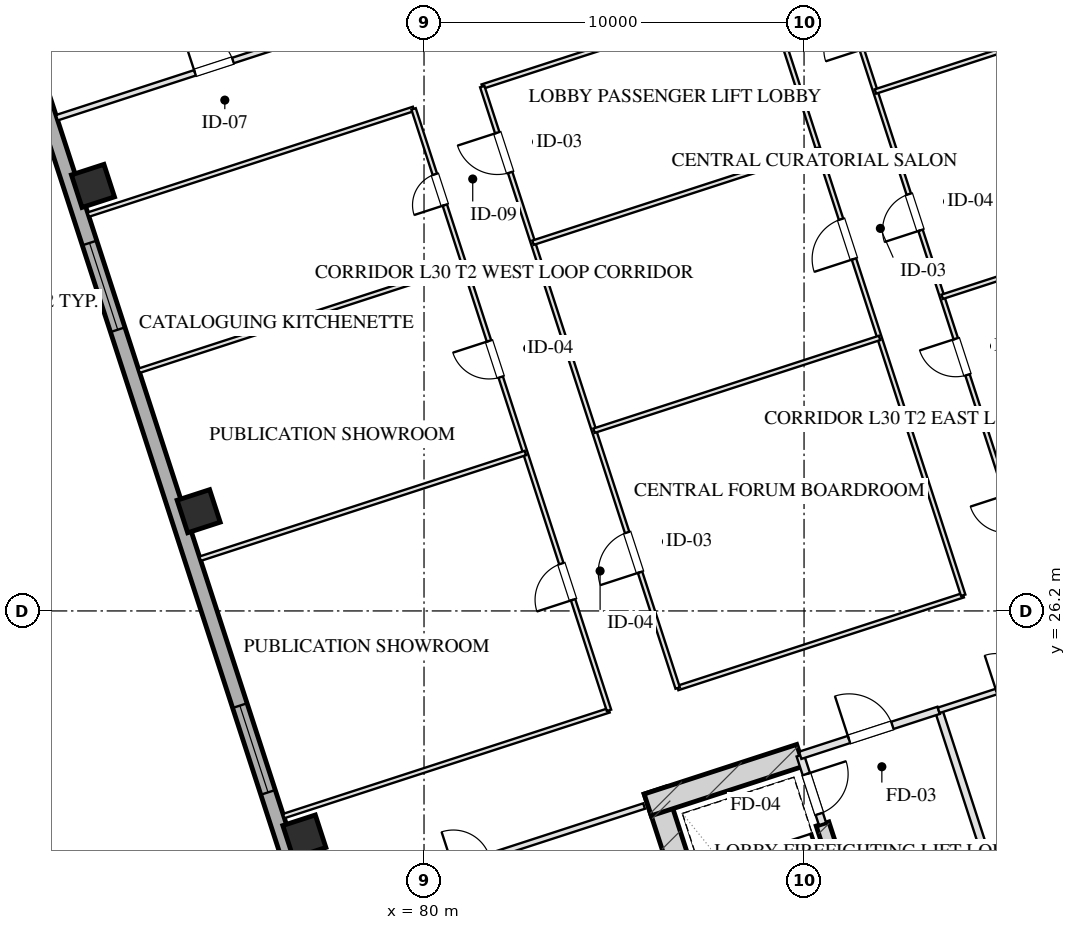
"""IFC4 building model, lengths in metres.
Left out: names, types, materials, properties, quantities, classifications, styles, units other than length and angle.
Written with IfcOpenShell. Run it as: python <this file> out.ifc"""

import sys

from ifc_helpers import new_model, si_unit, direction, frame, frame_2d, origin, origin_2d, place, context, subcontext, project, spatial, rectangle, hollow_rectangle, extrude, element, fill, save


model = new_model("IFC4")
c1 = context("Model", 3, precision=1e-05, world=origin(), true_north=direction((0.0, 1.0)))
c2 = subcontext(c1, "Body", "Model", "MODEL_VIEW")
j1 = project(units=[si_unit("LENGTHUNIT", "METRE"), si_unit("PLANEANGLEUNIT", "RADIAN")], contexts=[c1])
p1 = place(None, origin())
s1 = spatial("IfcSite", under=j1, at=p1, CompositionType="ELEMENT")
p2 = place(p1, origin())
s2 = spatial("IfcBuilding", under=s1, at=p2, CompositionType="ELEMENT")
p3 = place(p2, frame((0.0, 0.0, 117.3)))
s3 = spatial("IfcBuildingStorey", under=s2, at=p3, CompositionType="ELEMENT", Elevation=117.3)
p4 = place(p3, frame((86.078, 21.475, 0.0), z_axis=(0.0, 0.0, 1.0), x_axis=(0.309017938678, -0.951056209472, 0.0)))
e1 = element("IfcWall", 1, at=p4, inside=s3, PredefinedType="SHEAR", context=c2, shape_type="SweptSolid", body=[
    extrude(rectangle(XDim=9.48, YDim=0.6, at=frame_2d((4.74, 0.0))), origin(), (0.0, 0.0, 1.0), 3.45),
])
p5 = place(p3, frame((90.486, 20.594, 0.0), z_axis=(0.0, 0.0, 1.0), x_axis=(0.309020428229, -0.951055400562, 0.0)))
e2 = element("IfcWall", 2, at=p5, inside=s3, PredefinedType="SHEAR", context=c2, shape_type="SweptSolid", body=[
    extrude(rectangle(XDim=6.98, YDim=0.35, at=frame_2d((3.49, 0.0))), origin(), (0.0, 0.0, 1.0), 3.45),
])
p6 = place(p3, frame((85.886, 21.097, 0.0), z_axis=(0.0, 0.0, 1.0), x_axis=(0.951068073652, 0.308981422225, 0.0)))
e3 = element("IfcWall", 3, at=p6, inside=s3, PredefinedType="SHEAR", context=c2, shape_type="SweptSolid", body=[
    extrude(rectangle(XDim=4.22, YDim=0.6, at=frame_2d((2.11, 0.0))), origin(), (0.0, 0.0, 1.0), 3.45),
])
for number, where, z_axis, x_axis in (
    (4, (76.851, 20.264, 0.0), (0.0, 0.0, 1.0), (0.951, 0.309, 0.0)),
    (5, (74.07, 28.824, 0.0), (0.0, 0.0, 1.0), (0.951, 0.309, 0.0)),
    (6, (71.289, 37.384, 0.0), (0.0, 0.0, 1.0), (0.951, 0.309, 0.0)),
):
    element("IfcColumn", number, at=place(p3, frame(where, z_axis=z_axis, x_axis=x_axis)), inside=s3, PredefinedType="COLUMN", context=c2, shape_type="SweptSolid", body=[
        extrude(hollow_rectangle(XDim=0.9, YDim=0.9, WallThickness=0.032, at=origin_2d()), origin(), (0.0, 0.0, 1.0), 3.451),
    ])
p7 = place(p3, frame((80.716, 6.59, 0.0), z_axis=(0.0, 0.0, 1.0), x_axis=(-0.309017542002, 0.95105633836, 0.0)))
e7 = element("IfcWall", 7, at=p7, inside=s3, PredefinedType="SOLIDWALL", context=c2, shape_type="SweptSolid", body=[
    extrude(rectangle(XDim=46.4, YDim=0.4, at=frame_2d((23.2, 0.0))), origin(), (0.0, 0.0, 1.0), 2.61),
])
p8 = place(p7, frame((15.6, 0.0, 0.75)))
e8 = element("IfcOpeningElement", 8, at=p8, cuts=e7, PredefinedType="OPENING", context=c2, shape_type="SweptSolid", body=[
    extrude(rectangle(XDim=2.4, YDim=1.46, at=frame_2d((1.2, 0.73))), frame((0.0, 0.21, 0.0), z_axis=(0.0, -1.0, 0.0), x_axis=(1.0, 0.0, 0.0)), (0.0, 0.0, 1.0), 0.42),
])
p9 = place(p7, frame((28.4, 0.0, 0.75)))
e9 = element("IfcOpeningElement", 9, at=p9, cuts=e7, PredefinedType="OPENING", context=c2, shape_type="SweptSolid", body=[
    extrude(rectangle(XDim=2.4, YDim=1.46, at=frame_2d((1.2, 0.73))), frame((0.0, 0.21, 0.0), z_axis=(0.0, -1.0, 0.0), x_axis=(1.0, 0.0, 0.0)), (0.0, 0.0, 1.0), 0.42),
])
p10 = place(p3, frame((89.899, 22.401, 0.0), z_axis=(0.0, 0.0, 1.0), x_axis=(0.308932062672, -0.951084108086, 0.0)))
e10 = element("IfcWall", 10, at=p10, inside=s3, PredefinedType="PARTITIONING", context=c2, shape_type="SweptSolid", body=[
    extrude(rectangle(XDim=1.9, YDim=0.2, at=frame_2d((0.95, 0.0))), origin(), (0.0, 0.0, 1.0), 3.175),
])
p11 = place(p10, frame((0.52, 0.0, 0.0)))
e11 = element("IfcOpeningElement", 11, at=p11, cuts=e10, PredefinedType="OPENING", context=c2, shape_type="SweptSolid", body=[
    extrude(rectangle(XDim=1.1, YDim=2.05, at=frame_2d((0.55, 1.025))), frame((0.0, 0.11, 0.0), z_axis=(0.0, -1.0, 0.0), x_axis=(1.0, 0.0, 0.0)), (0.0, 0.0, 1.0), 0.22),
])
p12 = place(p3, frame((93.542, 23.585, 0.0), z_axis=(0.0, 0.0, 1.0), x_axis=(0.309042196757, -0.951048327176, 0.0)))
e12 = element("IfcWall", 12, at=p12, inside=s3, PredefinedType="PARTITIONING", context=c2, shape_type="SweptSolid", body=[
    extrude(rectangle(XDim=8.43, YDim=0.2, at=frame_2d((4.215, 0.0))), origin(), (0.0, 0.0, 1.0), 3.175),
])
p13 = place(p3, frame((89.899, 22.401, 0.0), z_axis=(0.0, 0.0, 1.0), x_axis=(0.951046716504, 0.309047153403, 0.0)))
e13 = element("IfcWall", 13, at=p13, inside=s3, PredefinedType="PARTITIONING", context=c2, shape_type="SweptSolid", body=[
    extrude(rectangle(XDim=3.83, YDim=0.2, at=frame_2d((1.915, 0.0))), origin(), (0.0, 0.0, 1.0), 3.175),
])
p14 = place(p13, frame((1.35, 0.0, 0.0)))
e14 = element("IfcOpeningElement", 14, at=p14, cuts=e13, PredefinedType="OPENING", context=c2, shape_type="SweptSolid", body=[
    extrude(rectangle(XDim=1.2, YDim=2.05, at=frame_2d((0.6, 1.025))), frame((0.0, 0.11, 0.0), z_axis=(0.0, -1.0, 0.0), x_axis=(1.0, 0.0, 0.0)), (0.0, 0.0, 1.0), 0.22),
])
p15 = place(p3, frame((93.542, 23.585, 0.0), z_axis=(0.0, 0.0, 1.0), x_axis=(0.951063829732, 0.308994485023, 0.0)))
e15 = element("IfcWall", 15, at=p15, inside=s3, PredefinedType="PARTITIONING", context=c2, shape_type="SweptSolid", body=[
    extrude(rectangle(XDim=4.4, YDim=0.15, at=frame_2d((2.2, 0.0))), origin(), (0.0, 0.0, 1.0), 3.175),
])
p16 = place(p15, frame((1.6, 0.0, 0.0)))
e16 = element("IfcOpeningElement", 16, at=p16, cuts=e15, PredefinedType="OPENING", context=c2, shape_type="SweptSolid", body=[
    extrude(rectangle(XDim=1.0, YDim=2.05, at=frame_2d((0.5, 1.025))), frame((0.0, 0.085, 0.0), z_axis=(0.0, -1.0, 0.0), x_axis=(1.0, 0.0, 0.0)), (0.0, 0.0, 1.0), 0.17),
])
p17 = place(p3, frame((77.136, 18.254, 0.0), z_axis=(0.0, 0.0, 1.0), x_axis=(0.951057133767, 0.309015093986, 0.0)))
e17 = element("IfcWall", 17, at=p17, inside=s3, PredefinedType="PARTITIONING", context=c2, shape_type="SweptSolid", body=[
    extrude(rectangle(XDim=9.1, YDim=0.15, at=frame_2d((4.55, 0.0))), origin(), (0.0, 0.0, 1.0), 3.175),
])
p18 = place(p17, frame((3.822, 0.0, 0.0)))
e18 = element("IfcOpeningElement", 18, at=p18, cuts=e17, PredefinedType="OPENING", context=c2, shape_type="SweptSolid", body=[
    extrude(rectangle(XDim=1.0, YDim=2.05, at=frame_2d((0.5, 1.025))), frame((0.0, 0.085, 0.0), z_axis=(0.0, -1.0, 0.0), x_axis=(1.0, 0.0, 0.0)), (0.0, 0.0, 1.0), 0.17),
])
p19 = place(p3, frame((70.338, 39.177, 0.0), z_axis=(0.0, 0.0, 1.0), x_axis=(0.951059695568, 0.309007209409, 0.0)))
e19 = element("IfcWall", 19, at=p19, inside=s3, PredefinedType="PARTITIONING", context=c2, shape_type="SweptSolid", body=[
    extrude(rectangle(XDim=9.1, YDim=0.15, at=frame_2d((4.55, 0.0))), origin(), (0.0, 0.0, 1.0), 3.175),
])
p20 = place(p19, frame((3.822, 0.0, 0.0)))
e20 = element("IfcOpeningElement", 20, at=p20, cuts=e19, PredefinedType="OPENING", context=c2, shape_type="SweptSolid", body=[
    extrude(rectangle(XDim=1.05, YDim=2.05, at=frame_2d((0.525, 1.025))), frame((0.0, 0.085, 0.0), z_axis=(0.0, -1.0, 0.0), x_axis=(1.0, 0.0, 0.0)), (0.0, 0.0, 1.0), 0.17),
])
p21 = place(p3, frame((76.308, 20.803, 0.0), z_axis=(0.0, 0.0, 1.0), x_axis=(0.951054001411, 0.309024734286, 0.0)))
e21 = element("IfcWall", 21, at=p21, inside=s3, PredefinedType="PARTITIONING", context=c2, shape_type="SweptSolid", body=[
    extrude(rectangle(XDim=9.0, YDim=0.12, at=frame_2d((4.5, 0.0))), origin(), (0.0, 0.0, 1.0), 3.175),
])
p22 = place(p3, frame((86.675, 24.171, 0.0), z_axis=(0.0, 0.0, 1.0), x_axis=(0.951057231385, 0.309014793547, 0.0)))
e22 = element("IfcWall", 22, at=p22, inside=s3, PredefinedType="PARTITIONING", context=c2, shape_type="SweptSolid", body=[
    extrude(rectangle(XDim=7.9, YDim=0.12, at=frame_2d((3.95, 0.0))), origin(), (0.0, 0.0, 1.0), 3.175),
])
p23 = place(p3, frame((71.166, 36.629, 0.0), z_axis=(0.0, 0.0, 1.0), x_axis=(0.951059383421, 0.309008170129, 0.0)))
e23 = element("IfcWall", 23, at=p23, inside=s3, PredefinedType="PARTITIONING", context=c2, shape_type="SweptSolid", body=[
    extrude(rectangle(XDim=9.0, YDim=0.12, at=frame_2d((4.5, 0.0))), origin(), (0.0, 0.0, 1.0), 3.175),
])
p24 = place(p3, frame((81.532, 39.997, 0.0), z_axis=(0.0, 0.0, 1.0), x_axis=(0.951048148493, 0.309042746635, 0.0)))
e24 = element("IfcWall", 24, at=p24, inside=s3, PredefinedType="PARTITIONING", context=c2, shape_type="SweptSolid", body=[
    extrude(rectangle(XDim=7.9, YDim=0.12, at=frame_2d((3.95, 0.0))), origin(), (0.0, 0.0, 1.0), 3.175),
])
p25 = place(p3, frame((84.867, 23.584, 0.0), z_axis=(0.0, 0.0, 1.0), x_axis=(-0.309022042254, 0.951054876125, 0.0)))
e25 = element("IfcWall", 25, at=p25, inside=s3, PredefinedType="PARTITIONING", context=c2, shape_type="SweptSolid", body=[
    extrude(rectangle(XDim=16.64, YDim=0.12, at=frame_2d((8.32, 0.0))), origin(), (0.0, 0.0, 1.0), 3.175),
])
p26 = place(p25, frame((3.06, 0.0, 0.0)))
e26 = element("IfcOpeningElement", 26, at=p26, cuts=e25, PredefinedType="OPENING", context=c2, shape_type="SweptSolid", body=[
    extrude(rectangle(XDim=1.0, YDim=2.05, at=frame_2d((0.5, 1.025))), frame((0.0, 0.07, 0.0), z_axis=(0.0, -1.0, 0.0), x_axis=(1.0, 0.0, 0.0)), (0.0, 0.0, 1.0), 0.14),
])
p27 = place(p25, frame((9.22, 0.0, 0.0)))
e27 = element("IfcOpeningElement", 27, at=p27, cuts=e25, PredefinedType="OPENING", context=c2, shape_type="SweptSolid", body=[
    extrude(rectangle(XDim=1.0, YDim=2.05, at=frame_2d((0.5, 1.025))), frame((0.0, 0.07, 0.0), z_axis=(0.0, -1.0, 0.0), x_axis=(1.0, 0.0, 0.0)), (0.0, 0.0, 1.0), 0.14),
])
p28 = place(p25, frame((13.98, 0.0, 0.0)))
e28 = element("IfcOpeningElement", 28, at=p28, cuts=e25, PredefinedType="OPENING", context=c2, shape_type="SweptSolid", body=[
    extrude(rectangle(XDim=0.85, YDim=2.05, at=frame_2d((0.425, 1.025))), frame((0.0, 0.07, 0.0), z_axis=(0.0, -1.0, 0.0), x_axis=(1.0, 0.0, 0.0)), (0.0, 0.0, 1.0), 0.14),
])
p29 = place(p3, frame((86.675, 24.171, 0.0), z_axis=(0.0, 0.0, 1.0), x_axis=(-0.309022042254, 0.951054876125, 0.0)))
e29 = element("IfcWall", 29, at=p29, inside=s3, PredefinedType="PARTITIONING", context=c2, shape_type="SweptSolid", body=[
    extrude(rectangle(XDim=16.64, YDim=0.12, at=frame_2d((8.32, 0.0))), origin(), (0.0, 0.0, 1.0), 3.175),
])
p30 = place(p29, frame((3.204, 0.0, 0.0)))
e30 = element("IfcOpeningElement", 30, at=p30, cuts=e29, PredefinedType="OPENING", context=c2, shape_type="SweptSolid", body=[
    extrude(rectangle(XDim=1.1, YDim=2.05, at=frame_2d((0.55, 1.025))), frame((0.0, 0.07, 0.0), z_axis=(0.0, -1.0, 0.0), x_axis=(1.0, 0.0, 0.0)), (0.0, 0.0, 1.0), 0.14),
])
p31 = place(p29, frame((14.264, 0.0, 0.0)))
e31 = element("IfcOpeningElement", 31, at=p31, cuts=e29, PredefinedType="OPENING", context=c2, shape_type="SweptSolid", body=[
    extrude(rectangle(XDim=1.1, YDim=2.05, at=frame_2d((0.55, 1.025))), frame((0.0, 0.07, 0.0), z_axis=(0.0, -1.0, 0.0), x_axis=(1.0, 0.0, 0.0)), (0.0, 0.0, 1.0), 0.14),
])
p32 = place(p3, frame((94.188, 26.613, 0.0), z_axis=(0.0, 0.0, 1.0), x_axis=(-0.30901773025, 0.951056277195, 0.0)))
e32 = element("IfcWall", 32, at=p32, inside=s3, PredefinedType="PARTITIONING", context=c2, shape_type="SweptSolid", body=[
    extrude(rectangle(XDim=16.64, YDim=0.12, at=frame_2d((8.32, 0.0))), origin(), (0.0, 0.0, 1.0), 3.175),
])
p33 = place(p32, frame((9.304, 0.0, 0.0)))
e33 = element("IfcOpeningElement", 33, at=p33, cuts=e32, PredefinedType="OPENING", context=c2, shape_type="SweptSolid", body=[
    extrude(rectangle(XDim=1.1, YDim=2.05, at=frame_2d((0.55, 1.025))), frame((0.0, 0.07, 0.0), z_axis=(0.0, -1.0, 0.0), x_axis=(1.0, 0.0, 0.0)), (0.0, 0.0, 1.0), 0.14),
])
p34 = place(p3, frame((95.995, 27.2, 0.0), z_axis=(0.0, 0.0, 1.0), x_axis=(-0.309022042254, 0.951054876125, 0.0)))
e34 = element("IfcWall", 34, at=p34, inside=s3, PredefinedType="PARTITIONING", context=c2, shape_type="SweptSolid", body=[
    extrude(rectangle(XDim=16.64, YDim=0.12, at=frame_2d((8.32, 0.0))), origin(), (0.0, 0.0, 1.0), 3.175),
])
p35 = place(p34, frame((1.16, 0.0, 0.0)))
e35 = element("IfcOpeningElement", 35, at=p35, cuts=e34, PredefinedType="OPENING", context=c2, shape_type="SweptSolid", body=[
    extrude(rectangle(XDim=1.0, YDim=2.05, at=frame_2d((0.5, 1.025))), frame((0.0, 0.07, 0.0), z_axis=(0.0, -1.0, 0.0), x_axis=(1.0, 0.0, 0.0)), (0.0, 0.0, 1.0), 0.14),
])
p36 = place(p34, frame((5.48, 0.0, 0.0)))
e36 = element("IfcOpeningElement", 36, at=p36, cuts=e34, PredefinedType="OPENING", context=c2, shape_type="SweptSolid", body=[
    extrude(rectangle(XDim=1.0, YDim=2.05, at=frame_2d((0.5, 1.025))), frame((0.0, 0.07, 0.0), z_axis=(0.0, -1.0, 0.0), x_axis=(1.0, 0.0, 0.0)), (0.0, 0.0, 1.0), 0.14),
])
p37 = place(p34, frame((9.48, 0.0, 0.0)))
e37 = element("IfcOpeningElement", 37, at=p37, cuts=e34, PredefinedType="OPENING", context=c2, shape_type="SweptSolid", body=[
    extrude(rectangle(XDim=1.0, YDim=2.05, at=frame_2d((0.5, 1.025))), frame((0.0, 0.07, 0.0), z_axis=(0.0, -1.0, 0.0), x_axis=(1.0, 0.0, 0.0)), (0.0, 0.0, 1.0), 0.14),
])
p38 = place(p34, frame((14.48, 0.0, 0.0)))
e38 = element("IfcOpeningElement", 38, at=p38, cuts=e34, PredefinedType="OPENING", context=c2, shape_type="SweptSolid", body=[
    extrude(rectangle(XDim=1.0, YDim=2.05, at=frame_2d((0.5, 1.025))), frame((0.0, 0.07, 0.0), z_axis=(0.0, -1.0, 0.0), x_axis=(1.0, 0.0, 0.0)), (0.0, 0.0, 1.0), 0.14),
])
for number, where, z_axis, x_axis in (
    (39, (84.474, 30.943, 0.0), (0.0, 0.0, 1.0), (0.951, 0.309, 0.0)),
    (40, (82.867, 35.888, 0.0), (0.0, 0.0, 1.0), (0.951, 0.309, 0.0)),
):
    element("IfcWall", number, at=place(p3, frame(where, z_axis=z_axis, x_axis=x_axis)), inside=s3, PredefinedType="PARTITIONING", context=c2, shape_type="SweptSolid", body=[
        extrude(rectangle(XDim=7.9, YDim=0.12, at=frame_2d((3.95, 0.0))), origin(), (0.0, 0.0, 1.0), 3.175),
    ])
p39 = place(p3, frame((74.108, 27.574, 0.0), z_axis=(0.0, 0.0, 1.0), x_axis=(0.951054001411, 0.309024734286, 0.0)))
e41 = element("IfcWall", 41, at=p39, inside=s3, PredefinedType="PARTITIONING", context=c2, shape_type="SweptSolid", body=[
    extrude(rectangle(XDim=9.0, YDim=0.12, at=frame_2d((4.5, 0.0))), origin(), (0.0, 0.0, 1.0), 3.175),
])
p40 = place(p3, frame((72.501, 32.52, 0.0), z_axis=(0.0, 0.0, 1.0), x_axis=(0.951051410833, 0.309032706929, 0.0)))
e42 = element("IfcWall", 42, at=p40, inside=s3, PredefinedType="PARTITIONING", context=c2, shape_type="SweptSolid", body=[
    extrude(rectangle(XDim=9.0, YDim=0.12, at=frame_2d((4.5, 0.0))), origin(), (0.0, 0.0, 1.0), 3.175),
])
for number, where, z_axis, x_axis in (
    (43, (94.66, 31.308, 0.0), (0.0, 0.0, 1.0), (0.951, 0.309, 0.0)),
    (44, (93.634, 34.466, 0.0), (0.0, 0.0, 1.0), (0.951, 0.309, 0.0)),
):
    element("IfcWall", number, at=place(p3, frame(where, z_axis=z_axis, x_axis=x_axis)), inside=s3, PredefinedType="PARTITIONING", context=c2, shape_type="SweptSolid", body=[
        extrude(rectangle(XDim=13.5, YDim=0.12, at=frame_2d((6.75, 0.0))), origin(), (0.0, 0.0, 1.0), 3.175),
    ])
p41 = place(p3, frame((91.879, 39.868, 0.0), z_axis=(0.0, 0.0, 1.0), x_axis=(0.951054001411, 0.309024734286, 0.0)))
e45 = element("IfcWall", 45, at=p41, inside=s3, PredefinedType="PARTITIONING", context=c2, shape_type="SweptSolid", body=[
    extrude(rectangle(XDim=13.5, YDim=0.12, at=frame_2d((6.75, 0.0))), origin(), (0.0, 0.0, 1.0), 3.175),
])
p42 = place(p8, origin())
e46 = element("IfcWindow", 46, at=p42, inside=s3, PartitioningType="TRIPLE_PANEL_VERTICAL", PredefinedType="WINDOW", context=c2, shape_type="SweptSolid", body=[
    extrude(rectangle(XDim=2.4, YDim=1.46, at=frame_2d((1.2, 0.73))), frame((0.0, 0.03, 0.0), z_axis=(0.0, -1.0, 0.0), x_axis=(1.0, 0.0, 0.0)), (0.0, 0.0, 1.0), 0.06),
])
fill(e8, e46)
p43 = place(p9, origin())
e47 = element("IfcWindow", 47, at=p43, inside=s3, PartitioningType="TRIPLE_PANEL_VERTICAL", PredefinedType="WINDOW", context=c2, shape_type="SweptSolid", body=[
    extrude(rectangle(XDim=2.4, YDim=1.46, at=frame_2d((1.2, 0.73))), frame((0.0, 0.03, 0.0), z_axis=(0.0, -1.0, 0.0), x_axis=(1.0, 0.0, 0.0)), (0.0, 0.0, 1.0), 0.06),
])
fill(e9, e47)
p44 = place(p11, origin())
e48 = element("IfcDoor", 48, at=p44, inside=s3, OperationType="SINGLE_SWING_LEFT", PredefinedType="DOOR", context=c2, shape_type="SweptSolid", body=[
    extrude(rectangle(XDim=1.1, YDim=2.05, at=frame_2d((0.55, 1.025))), frame((0.0, 0.025, 0.0), z_axis=(0.0, -1.0, 0.0), x_axis=(1.0, 0.0, 0.0)), (0.0, 0.0, 1.0), 0.05),
])
fill(e11, e48)
p45 = place(p14, origin())
e49 = element("IfcDoor", 49, at=p45, inside=s3, OperationType="SINGLE_SWING_LEFT", PredefinedType="DOOR", context=c2, shape_type="SweptSolid", body=[
    extrude(rectangle(XDim=1.2, YDim=2.05, at=frame_2d((0.6, 1.025))), frame((0.0, 0.025, 0.0), z_axis=(0.0, -1.0, 0.0), x_axis=(1.0, 0.0, 0.0)), (0.0, 0.0, 1.0), 0.05),
])
fill(e14, e49)
p46 = place(p16, origin())
e50 = element("IfcDoor", 50, at=p46, inside=s3, OperationType="SINGLE_SWING_LEFT", PredefinedType="DOOR", context=c2, shape_type="SweptSolid", body=[
    extrude(rectangle(XDim=1.0, YDim=2.05, at=frame_2d((0.5, 1.025))), frame((0.0, 0.025, 0.0), z_axis=(0.0, -1.0, 0.0), x_axis=(1.0, 0.0, 0.0)), (0.0, 0.0, 1.0), 0.05),
])
fill(e16, e50)
p47 = place(p20, origin())
e51 = element("IfcDoor", 51, at=p47, inside=s3, OperationType="SINGLE_SWING_LEFT", PredefinedType="DOOR", context=c2, shape_type="SweptSolid", body=[
    extrude(rectangle(XDim=1.05, YDim=2.05, at=frame_2d((0.525, 1.025))), frame((0.0, 0.025, 0.0), z_axis=(0.0, -1.0, 0.0), x_axis=(1.0, 0.0, 0.0)), (0.0, 0.0, 1.0), 0.05),
])
fill(e20, e51)
p48 = place(p26, origin())
e52 = element("IfcDoor", 52, at=p48, inside=s3, OperationType="SINGLE_SWING_LEFT", PredefinedType="DOOR", context=c2, shape_type="SweptSolid", body=[
    extrude(rectangle(XDim=1.0, YDim=2.05, at=frame_2d((0.5, 1.025))), frame((0.0, 0.025, 0.0), z_axis=(0.0, -1.0, 0.0), x_axis=(1.0, 0.0, 0.0)), (0.0, 0.0, 1.0), 0.05),
])
fill(e26, e52)
p49 = place(p27, origin())
e53 = element("IfcDoor", 53, at=p49, inside=s3, OperationType="SINGLE_SWING_RIGHT", PredefinedType="DOOR", context=c2, shape_type="SweptSolid", body=[
    extrude(rectangle(XDim=1.0, YDim=2.05, at=frame_2d((0.5, 1.025))), frame((0.0, 0.025, 0.0), z_axis=(0.0, -1.0, 0.0), x_axis=(1.0, 0.0, 0.0)), (0.0, 0.0, 1.0), 0.05),
])
fill(e27, e53)
p50 = place(p28, origin())
e54 = element("IfcDoor", 54, at=p50, inside=s3, OperationType="SINGLE_SWING_LEFT", PredefinedType="DOOR", context=c2, shape_type="SweptSolid", body=[
    extrude(rectangle(XDim=0.85, YDim=2.05, at=frame_2d((0.425, 1.025))), frame((0.0, 0.025, 0.0), z_axis=(0.0, -1.0, 0.0), x_axis=(1.0, 0.0, 0.0)), (0.0, 0.0, 1.0), 0.05),
])
fill(e28, e54)
p51 = place(p30, origin())
e55 = element("IfcDoor", 55, at=p51, inside=s3, OperationType="SINGLE_SWING_LEFT", PredefinedType="DOOR", context=c2, shape_type="SweptSolid", body=[
    extrude(rectangle(XDim=1.1, YDim=2.05, at=frame_2d((0.55, 1.025))), frame((0.0, 0.025, 0.0), z_axis=(0.0, -1.0, 0.0), x_axis=(1.0, 0.0, 0.0)), (0.0, 0.0, 1.0), 0.05),
])
fill(e30, e55)
p52 = place(p31, origin())
e56 = element("IfcDoor", 56, at=p52, inside=s3, OperationType="SINGLE_SWING_RIGHT", PredefinedType="DOOR", context=c2, shape_type="SweptSolid", body=[
    extrude(rectangle(XDim=1.1, YDim=2.05, at=frame_2d((0.55, 1.025))), frame((0.0, 0.025, 0.0), z_axis=(0.0, -1.0, 0.0), x_axis=(1.0, 0.0, 0.0)), (0.0, 0.0, 1.0), 0.05),
])
fill(e31, e56)
p53 = place(p33, origin())
e57 = element("IfcDoor", 57, at=p53, inside=s3, OperationType="SINGLE_SWING_LEFT", PredefinedType="DOOR", context=c2, shape_type="SweptSolid", body=[
    extrude(rectangle(XDim=1.1, YDim=2.05, at=frame_2d((0.55, 1.025))), frame((0.0, 0.025, 0.0), z_axis=(0.0, -1.0, 0.0), x_axis=(1.0, 0.0, 0.0)), (0.0, 0.0, 1.0), 0.05),
])
fill(e33, e57)
p54 = place(p36, origin())
e58 = element("IfcDoor", 58, at=p54, inside=s3, OperationType="SINGLE_SWING_RIGHT", PredefinedType="DOOR", context=c2, shape_type="SweptSolid", body=[
    extrude(rectangle(XDim=1.0, YDim=2.05, at=frame_2d((0.5, 1.025))), frame((0.0, 0.025, 0.0), z_axis=(0.0, -1.0, 0.0), x_axis=(1.0, 0.0, 0.0)), (0.0, 0.0, 1.0), 0.05),
])
fill(e36, e58)
p55 = place(p37, origin())
e59 = element("IfcDoor", 59, at=p55, inside=s3, OperationType="SINGLE_SWING_LEFT", PredefinedType="DOOR", context=c2, shape_type="SweptSolid", body=[
    extrude(rectangle(XDim=1.0, YDim=2.05, at=frame_2d((0.5, 1.025))), frame((0.0, 0.025, 0.0), z_axis=(0.0, -1.0, 0.0), x_axis=(1.0, 0.0, 0.0)), (0.0, 0.0, 1.0), 0.05),
])
fill(e37, e59)
save(model, sys.argv[1])
